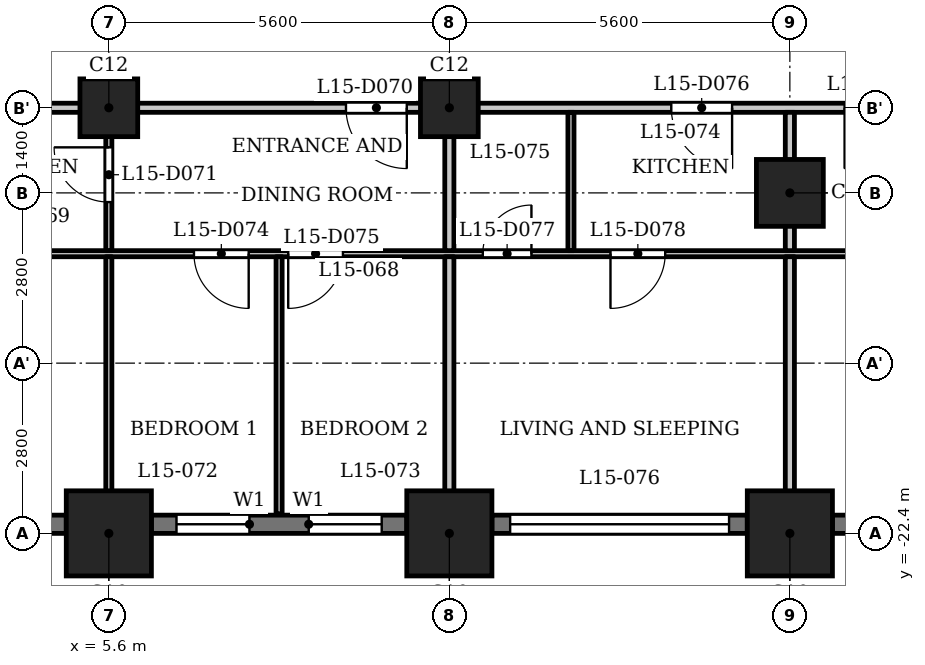
"""IFC4 building model, lengths in metres.
Left out: names, types, materials, properties, quantities, classifications, styles, units other than length and angle.
Written with IfcOpenShell. Run it as: python <this file> out.ifc"""

import sys

from ifc_helpers import new_model, si_unit, direction, frame, frame_2d, origin, origin_2d, place, context, subcontext, project, spatial, rectangle, extrude, element, fill, save


model = new_model("IFC4")
c1 = context("Model", 3, precision=1e-05, world=origin(), true_north=direction((0.0, 1.0)))
c2 = subcontext(c1, "Body", "Model", "MODEL_VIEW")
j1 = project(units=[si_unit("LENGTHUNIT", "METRE"), si_unit("PLANEANGLEUNIT", "RADIAN")], contexts=[c1])
p1 = place(None, origin())
s1 = spatial("IfcSite", under=j1, at=p1, CompositionType="ELEMENT")
p2 = place(p1, origin())
s2 = spatial("IfcBuilding", under=s1, at=p2, CompositionType="ELEMENT")
p3 = place(p2, frame((0.0, 0.0, 62.0)))
s3 = spatial("IfcBuildingStorey", under=s2, at=p3, CompositionType="ELEMENT", Elevation=62.0)
for number, where, z_axis, x_axis in (
    (1, (5.6, -22.4, 0.0), (0.0, 0.0, 1.0), (1.0, 0.0, 0.0)),
    (2, (11.2, -22.4, 0.0), (0.0, 0.0, 1.0), (1.0, 0.0, 0.0)),
    (3, (16.8, -22.4, 0.0), (0.0, 0.0, 1.0), (1.0, 0.0, 0.0)),
):
    element("IfcColumn", number, at=place(p3, frame(where, z_axis=z_axis, x_axis=x_axis)), inside=s3, PredefinedType="COLUMN", context=c2, shape_type="SweptSolid", body=[
        extrude(rectangle(XDim=1.4, YDim=1.4, at=origin_2d()), origin(), (0.0, 0.0, 1.0), 3.5),
    ])
p4 = place(p3, frame((16.8, -16.8, 0.0), z_axis=(0.0, 0.0, 1.0), x_axis=(1.0, 0.0, 0.0)))
e4 = element("IfcColumn", 4, at=p4, inside=s3, PredefinedType="COLUMN", context=c2, shape_type="SweptSolid", body=[
    extrude(rectangle(XDim=1.1, YDim=1.1, at=origin_2d()), origin(), (0.0, 0.0, 1.0), 3.5),
])
for number, where, z_axis, x_axis in (
    (5, (5.6, -15.4, 0.0), (0.0, 0.0, 1.0), (1.0, 0.0, 0.0)),
    (6, (11.2, -15.4, 0.0), (0.0, 0.0, 1.0), (1.0, 0.0, 0.0)),
):
    element("IfcColumn", number, at=place(p3, frame(where, z_axis=z_axis, x_axis=x_axis)), inside=s3, PredefinedType="COLUMN", context=c2, shape_type="SweptSolid", body=[
        extrude(rectangle(XDim=0.95, YDim=0.95, at=origin_2d()), origin(), (0.0, 0.0, 1.0), 3.5),
    ])
p5 = place(p3, frame((0.7, -22.25, 0.0), z_axis=(0.0, 0.0, 1.0), x_axis=(1.0, 0.0, 0.0)))
e7 = element("IfcWall", 7, at=p5, inside=s3, PredefinedType="SOLIDWALL", context=c2, shape_type="SweptSolid", body=[
    extrude(rectangle(XDim=4.2, YDim=0.3, at=frame_2d((2.1, 0.0))), origin(), (0.0, 0.0, 1.0), 2.35),
])
p6 = place(p5, frame((0.3, 0.0, 1.2)))
e8 = element("IfcOpeningElement", 8, at=p6, cuts=e7, PredefinedType="OPENING", context=c2, shape_type="SweptSolid", body=[
    extrude(rectangle(XDim=3.6, YDim=0.95, at=frame_2d((1.8, 0.475))), frame((0.0, 0.16, 0.0), z_axis=(0.0, -1.0, 0.0), x_axis=(1.0, 0.0, 0.0)), (0.0, 0.0, 1.0), 0.32),
])
p7 = place(p3, frame((6.3, -22.25, 0.0), z_axis=(0.0, 0.0, 1.0), x_axis=(1.0, 0.0, 0.0)))
e9 = element("IfcWall", 9, at=p7, inside=s3, PredefinedType="SOLIDWALL", context=c2, shape_type="SweptSolid", body=[
    extrude(rectangle(XDim=4.2, YDim=0.3, at=frame_2d((2.1, 0.0))), origin(), (0.0, 0.0, 1.0), 2.35),
])
p8 = place(p7, frame((0.413, 0.0, 0.6)))
e10 = element("IfcOpeningElement", 10, at=p8, cuts=e9, PredefinedType="OPENING", context=c2, shape_type="SweptSolid", body=[
    extrude(rectangle(XDim=1.2, YDim=1.55, at=frame_2d((0.6, 0.775))), frame((0.0, 0.16, 0.0), z_axis=(0.0, -1.0, 0.0), x_axis=(1.0, 0.0, 0.0)), (0.0, 0.0, 1.0), 0.32),
])
p9 = place(p7, frame((2.587, 0.0, 0.6)))
e11 = element("IfcOpeningElement", 11, at=p9, cuts=e9, PredefinedType="OPENING", context=c2, shape_type="SweptSolid", body=[
    extrude(rectangle(XDim=1.2, YDim=1.55, at=frame_2d((0.6, 0.775))), frame((0.0, 0.16, 0.0), z_axis=(0.0, -1.0, 0.0), x_axis=(1.0, 0.0, 0.0)), (0.0, 0.0, 1.0), 0.32),
])
p10 = place(p3, frame((11.9, -22.25, 0.0), z_axis=(0.0, 0.0, 1.0), x_axis=(1.0, 0.0, 0.0)))
e12 = element("IfcWall", 12, at=p10, inside=s3, PredefinedType="SOLIDWALL", context=c2, shape_type="SweptSolid", body=[
    extrude(rectangle(XDim=4.2, YDim=0.3, at=frame_2d((2.1, 0.0))), origin(), (0.0, 0.0, 1.0), 2.35),
])
p11 = place(p10, frame((0.3, 0.0, 1.2)))
e13 = element("IfcOpeningElement", 13, at=p11, cuts=e12, PredefinedType="OPENING", context=c2, shape_type="SweptSolid", body=[
    extrude(rectangle(XDim=3.6, YDim=0.95, at=frame_2d((1.8, 0.475))), frame((0.0, 0.16, 0.0), z_axis=(0.0, -1.0, 0.0), x_axis=(1.0, 0.0, 0.0)), (0.0, 0.0, 1.0), 0.32),
])
p12 = place(p3, frame((17.5, -22.25, 0.0), z_axis=(0.0, 0.0, 1.0), x_axis=(1.0, 0.0, 0.0)))
e14 = element("IfcWall", 14, at=p12, inside=s3, PredefinedType="SOLIDWALL", context=c2, shape_type="SweptSolid", body=[
    extrude(rectangle(XDim=2.5, YDim=0.3, at=frame_2d((1.25, 0.0))), origin(), (0.0, 0.0, 1.0), 2.35),
])
p13 = place(p12, frame((0.65, 0.0, 0.6)))
e15 = element("IfcOpeningElement", 15, at=p13, cuts=e14, PredefinedType="OPENING", context=c2, shape_type="SweptSolid", body=[
    extrude(rectangle(XDim=1.2, YDim=1.55, at=frame_2d((0.6, 0.775))), frame((0.0, 0.16, 0.0), z_axis=(0.0, -1.0, 0.0), x_axis=(1.0, 0.0, 0.0)), (0.0, 0.0, 1.0), 0.32),
])
p14 = place(p3, frame((-26.394, -17.8, 0.0), z_axis=(0.0, 0.0, 1.0), x_axis=(1.0, 0.0, 0.0)))
e16 = element("IfcWall", 16, at=p14, inside=s3, PredefinedType="PARTITIONING", context=c2, shape_type="SweptSolid", body=[
    extrude(rectangle(XDim=53.034, YDim=0.1, at=frame_2d((26.517, 0.0))), origin(), (0.0, 0.0, 1.0), 3.2),
])
p15 = place(p14, frame((0.794, 0.0, 0.0)))
e17 = element("IfcOpeningElement", 17, at=p15, cuts=e16, PredefinedType="OPENING", context=c2, shape_type="SweptSolid", body=[
    extrude(rectangle(XDim=0.8, YDim=2.1, at=frame_2d((0.4, 1.05))), frame((0.0, 0.06, 0.0), z_axis=(0.0, -1.0, 0.0), x_axis=(1.0, 0.0, 0.0)), (0.0, 0.0, 1.0), 0.12),
])
p16 = place(p14, frame((5.644, 0.0, 0.0)))
e18 = element("IfcOpeningElement", 18, at=p16, cuts=e16, PredefinedType="OPENING", context=c2, shape_type="SweptSolid", body=[
    extrude(rectangle(XDim=0.9, YDim=2.1, at=frame_2d((0.45, 1.05))), frame((0.0, 0.06, 0.0), z_axis=(0.0, -1.0, 0.0), x_axis=(1.0, 0.0, 0.0)), (0.0, 0.0, 1.0), 0.12),
])
p17 = place(p14, frame((10.494, 0.0, 0.0)))
e19 = element("IfcOpeningElement", 19, at=p17, cuts=e16, PredefinedType="OPENING", context=c2, shape_type="SweptSolid", body=[
    extrude(rectangle(XDim=0.8, YDim=2.1, at=frame_2d((0.4, 1.05))), frame((0.0, 0.06, 0.0), z_axis=(0.0, -1.0, 0.0), x_axis=(1.0, 0.0, 0.0)), (0.0, 0.0, 1.0), 0.12),
])
p18 = place(p14, frame((13.844, 0.0, 0.0)))
e20 = element("IfcOpeningElement", 20, at=p18, cuts=e16, PredefinedType="OPENING", context=c2, shape_type="SweptSolid", body=[
    extrude(rectangle(XDim=0.9, YDim=2.1, at=frame_2d((0.45, 1.05))), frame((0.0, 0.06, 0.0), z_axis=(0.0, -1.0, 0.0), x_axis=(1.0, 0.0, 0.0)), (0.0, 0.0, 1.0), 0.12),
])
p19 = place(p14, frame((19.344, 0.0, 0.0)))
e21 = element("IfcOpeningElement", 21, at=p19, cuts=e16, PredefinedType="OPENING", context=c2, shape_type="SweptSolid", body=[
    extrude(rectangle(XDim=0.8, YDim=2.1, at=frame_2d((0.4, 1.05))), frame((0.0, 0.06, 0.0), z_axis=(0.0, -1.0, 0.0), x_axis=(1.0, 0.0, 0.0)), (0.0, 0.0, 1.0), 0.12),
])
p20 = place(p14, frame((16.094, 0.0, 0.0)))
e22 = element("IfcOpeningElement", 22, at=p20, cuts=e16, PredefinedType="OPENING", context=c2, shape_type="SweptSolid", body=[
    extrude(rectangle(XDim=0.9, YDim=2.1, at=frame_2d((0.45, 1.05))), frame((0.0, 0.06, 0.0), z_axis=(0.0, -1.0, 0.0), x_axis=(1.0, 0.0, 0.0)), (0.0, 0.0, 1.0), 0.12),
])
p21 = place(p14, frame((24.944, 0.0, 0.0)))
e23 = element("IfcOpeningElement", 23, at=p21, cuts=e16, PredefinedType="OPENING", context=c2, shape_type="SweptSolid", body=[
    extrude(rectangle(XDim=0.8, YDim=2.1, at=frame_2d((0.4, 1.05))), frame((0.0, 0.06, 0.0), z_axis=(0.0, -1.0, 0.0), x_axis=(1.0, 0.0, 0.0)), (0.0, 0.0, 1.0), 0.12),
])
p22 = place(p14, frame((22.444, 0.0, 0.0)))
e24 = element("IfcOpeningElement", 24, at=p22, cuts=e16, PredefinedType="OPENING", context=c2, shape_type="SweptSolid", body=[
    extrude(rectangle(XDim=0.9, YDim=2.1, at=frame_2d((0.45, 1.05))), frame((0.0, 0.06, 0.0), z_axis=(0.0, -1.0, 0.0), x_axis=(1.0, 0.0, 0.0)), (0.0, 0.0, 1.0), 0.12),
])
p23 = place(p14, frame((26.944, 0.0, 0.0)))
e25 = element("IfcOpeningElement", 25, at=p23, cuts=e16, PredefinedType="OPENING", context=c2, shape_type="SweptSolid", body=[
    extrude(rectangle(XDim=0.8, YDim=2.1, at=frame_2d((0.4, 1.05))), frame((0.0, 0.06, 0.0), z_axis=(0.0, -1.0, 0.0), x_axis=(1.0, 0.0, 0.0)), (0.0, 0.0, 1.0), 0.12),
])
p24 = place(p14, frame((29.794, 0.0, 0.0)))
e26 = element("IfcOpeningElement", 26, at=p24, cuts=e16, PredefinedType="OPENING", context=c2, shape_type="SweptSolid", body=[
    extrude(rectangle(XDim=0.9, YDim=2.1, at=frame_2d((0.45, 1.05))), frame((0.0, 0.06, 0.0), z_axis=(0.0, -1.0, 0.0), x_axis=(1.0, 0.0, 0.0)), (0.0, 0.0, 1.0), 0.12),
])
p25 = place(p14, frame((33.394, 0.0, 0.0)))
e27 = element("IfcOpeningElement", 27, at=p25, cuts=e16, PredefinedType="OPENING", context=c2, shape_type="SweptSolid", body=[
    extrude(rectangle(XDim=0.9, YDim=2.1, at=frame_2d((0.45, 1.05))), frame((0.0, 0.06, 0.0), z_axis=(0.0, -1.0, 0.0), x_axis=(1.0, 0.0, 0.0)), (0.0, 0.0, 1.0), 0.12),
])
p26 = place(p14, frame((34.944, 0.0, 0.0)))
e28 = element("IfcOpeningElement", 28, at=p26, cuts=e16, PredefinedType="OPENING", context=c2, shape_type="SweptSolid", body=[
    extrude(rectangle(XDim=0.9, YDim=2.1, at=frame_2d((0.45, 1.05))), frame((0.0, 0.06, 0.0), z_axis=(0.0, -1.0, 0.0), x_axis=(1.0, 0.0, 0.0)), (0.0, 0.0, 1.0), 0.12),
])
p27 = place(p14, frame((38.144, 0.0, 0.0)))
e29 = element("IfcOpeningElement", 29, at=p27, cuts=e16, PredefinedType="OPENING", context=c2, shape_type="SweptSolid", body=[
    extrude(rectangle(XDim=0.8, YDim=2.1, at=frame_2d((0.4, 1.05))), frame((0.0, 0.06, 0.0), z_axis=(0.0, -1.0, 0.0), x_axis=(1.0, 0.0, 0.0)), (0.0, 0.0, 1.0), 0.12),
])
p28 = place(p14, frame((40.244, 0.0, 0.0)))
e30 = element("IfcOpeningElement", 30, at=p28, cuts=e16, PredefinedType="OPENING", context=c2, shape_type="SweptSolid", body=[
    extrude(rectangle(XDim=0.9, YDim=2.1, at=frame_2d((0.45, 1.05))), frame((0.0, 0.06, 0.0), z_axis=(0.0, -1.0, 0.0), x_axis=(1.0, 0.0, 0.0)), (0.0, 0.0, 1.0), 0.12),
])
p29 = place(p14, frame((49.362, 0.0, 0.0)))
e31 = element("IfcOpeningElement", 31, at=p29, cuts=e16, PredefinedType="OPENING", context=c2, shape_type="SweptSolid", body=[
    extrude(rectangle(XDim=0.8, YDim=2.1, at=frame_2d((0.4, 1.05))), frame((0.0, 0.06, 0.0), z_axis=(0.0, -1.0, 0.0), x_axis=(1.0, 0.0, 0.0)), (0.0, 0.0, 1.0), 0.12),
])
p30 = place(p14, frame((45.094, 0.0, 0.0)))
e32 = element("IfcOpeningElement", 32, at=p30, cuts=e16, PredefinedType="OPENING", context=c2, shape_type="SweptSolid", body=[
    extrude(rectangle(XDim=0.9, YDim=2.1, at=frame_2d((0.45, 1.05))), frame((0.0, 0.06, 0.0), z_axis=(0.0, -1.0, 0.0), x_axis=(1.0, 0.0, 0.0)), (0.0, 0.0, 1.0), 0.12),
])
p31 = place(p3, frame((-27.484, -15.4, 0.0), z_axis=(0.0, 0.0, 1.0), x_axis=(1.0, 0.0, 0.0)))
e33 = element("IfcWall", 33, at=p31, inside=s3, PredefinedType="PARTITIONING", context=c2, shape_type="SweptSolid", body=[
    extrude(rectangle(XDim=54.968, YDim=0.15, at=frame_2d((27.484, 0.0))), origin(), (0.0, 0.0, 1.0), 3.2),
])
p32 = place(p31, frame((5.734, 0.0, 0.0)))
e34 = element("IfcOpeningElement", 34, at=p32, cuts=e33, PredefinedType="OPENING", context=c2, shape_type="SweptSolid", body=[
    extrude(rectangle(XDim=1.0, YDim=2.1, at=frame_2d((0.5, 1.05))), frame((0.0, 0.085, 0.0), z_axis=(0.0, -1.0, 0.0), x_axis=(1.0, 0.0, 0.0)), (0.0, 0.0, 1.0), 0.17),
])
p33 = place(p31, frame((13.934, 0.0, 0.0)))
e35 = element("IfcOpeningElement", 35, at=p33, cuts=e33, PredefinedType="OPENING", context=c2, shape_type="SweptSolid", body=[
    extrude(rectangle(XDim=1.0, YDim=2.1, at=frame_2d((0.5, 1.05))), frame((0.0, 0.085, 0.0), z_axis=(0.0, -1.0, 0.0), x_axis=(1.0, 0.0, 0.0)), (0.0, 0.0, 1.0), 0.17),
])
p34 = place(p31, frame((18.184, 0.0, 0.0)))
e36 = element("IfcOpeningElement", 36, at=p34, cuts=e33, PredefinedType="OPENING", context=c2, shape_type="SweptSolid", body=[
    extrude(rectangle(XDim=1.0, YDim=2.1, at=frame_2d((0.5, 1.05))), frame((0.0, 0.085, 0.0), z_axis=(0.0, -1.0, 0.0), x_axis=(1.0, 0.0, 0.0)), (0.0, 0.0, 1.0), 0.17),
])
p35 = place(p31, frame((22.534, 0.0, 0.0)))
e37 = element("IfcOpeningElement", 37, at=p35, cuts=e33, PredefinedType="OPENING", context=c2, shape_type="SweptSolid", body=[
    extrude(rectangle(XDim=1.0, YDim=2.1, at=frame_2d((0.5, 1.05))), frame((0.0, 0.085, 0.0), z_axis=(0.0, -1.0, 0.0), x_axis=(1.0, 0.0, 0.0)), (0.0, 0.0, 1.0), 0.17),
])
p36 = place(p31, frame((36.984, 0.0, 0.0)))
e38 = element("IfcOpeningElement", 38, at=p36, cuts=e33, PredefinedType="OPENING", context=c2, shape_type="SweptSolid", body=[
    extrude(rectangle(XDim=1.0, YDim=2.1, at=frame_2d((0.5, 1.05))), frame((0.0, 0.085, 0.0), z_axis=(0.0, -1.0, 0.0), x_axis=(1.0, 0.0, 0.0)), (0.0, 0.0, 1.0), 0.17),
])
p37 = place(p31, frame((42.334, 0.0, 0.0)))
e39 = element("IfcOpeningElement", 39, at=p37, cuts=e33, PredefinedType="OPENING", context=c2, shape_type="SweptSolid", body=[
    extrude(rectangle(XDim=1.0, YDim=2.1, at=frame_2d((0.5, 1.05))), frame((0.0, 0.085, 0.0), z_axis=(0.0, -1.0, 0.0), x_axis=(1.0, 0.0, 0.0)), (0.0, 0.0, 1.0), 0.17),
])
p38 = place(p31, frame((45.184, 0.0, 0.0)))
e40 = element("IfcOpeningElement", 40, at=p38, cuts=e33, PredefinedType="OPENING", context=c2, shape_type="SweptSolid", body=[
    extrude(rectangle(XDim=1.0, YDim=2.1, at=frame_2d((0.5, 1.05))), frame((0.0, 0.085, 0.0), z_axis=(0.0, -1.0, 0.0), x_axis=(1.0, 0.0, 0.0)), (0.0, 0.0, 1.0), 0.17),
])
p39 = place(p3, frame((5.6, -23.08, 0.0), z_axis=(0.0, 0.0, 1.0), x_axis=(0.0, 1.0, 0.0)))
e41 = element("IfcWall", 41, at=p39, inside=s3, PredefinedType="PARTITIONING", context=c2, shape_type="SweptSolid", body=[
    extrude(rectangle(XDim=5.23, YDim=0.1, at=frame_2d((2.615, 0.0))), origin(), (0.0, 0.0, 1.0), 3.2),
])
p40 = place(p3, frame((5.6, -17.75, 0.0), z_axis=(0.0, 0.0, 1.0), x_axis=(0.0, 1.0, 0.0)))
e42 = element("IfcWall", 42, at=p40, inside=s3, PredefinedType="PARTITIONING", context=c2, shape_type="SweptSolid", body=[
    extrude(rectangle(XDim=2.275, YDim=0.1, at=frame_2d((1.137, 0.0))), origin(), (0.0, 0.0, 1.0), 3.2),
])
p41 = place(p40, frame((0.799, 0.0, 0.0)))
e43 = element("IfcOpeningElement", 43, at=p41, cuts=e42, PredefinedType="OPENING", context=c2, shape_type="SweptSolid", body=[
    extrude(rectangle(XDim=0.9, YDim=2.1, at=frame_2d((0.45, 1.05))), frame((0.0, 0.06, 0.0), z_axis=(0.0, -1.0, 0.0), x_axis=(1.0, 0.0, 0.0)), (0.0, 0.0, 1.0), 0.12),
])
p42 = place(p3, frame((8.4, -22.08, 0.0), z_axis=(0.0, 0.0, 1.0), x_axis=(0.0, 1.0, 0.0)))
e44 = element("IfcWall", 44, at=p42, inside=s3, PredefinedType="PARTITIONING", context=c2, shape_type="SweptSolid", body=[
    extrude(rectangle(XDim=4.23, YDim=0.1, at=frame_2d((2.115, 0.0))), origin(), (0.0, 0.0, 1.0), 3.2),
])
p43 = place(p3, frame((11.2, -23.08, 0.0), z_axis=(0.0, 0.0, 1.0), x_axis=(0.0, 1.0, 0.0)))
e45 = element("IfcWall", 45, at=p43, inside=s3, PredefinedType="PARTITIONING", context=c2, shape_type="SweptSolid", body=[
    extrude(rectangle(XDim=5.23, YDim=0.15, at=frame_2d((2.615, 0.0))), origin(), (0.0, 0.0, 1.0), 3.2),
])
p44 = place(p3, frame((11.2, -17.75, 0.0), z_axis=(0.0, 0.0, 1.0), x_axis=(0.0, 1.0, 0.0)))
e46 = element("IfcWall", 46, at=p44, inside=s3, PredefinedType="PARTITIONING", context=c2, shape_type="SweptSolid", body=[
    extrude(rectangle(XDim=2.275, YDim=0.15, at=frame_2d((1.137, 0.0))), origin(), (0.0, 0.0, 1.0), 3.2),
])
p45 = place(p3, frame((13.2, -17.75, 0.0), z_axis=(0.0, 0.0, 1.0), x_axis=(0.0, 1.0, 0.0)))
e47 = element("IfcWall", 47, at=p45, inside=s3, PredefinedType="PARTITIONING", context=c2, shape_type="SweptSolid", body=[
    extrude(rectangle(XDim=2.275, YDim=0.1, at=frame_2d((1.137, 0.0))), origin(), (0.0, 0.0, 1.0), 3.2),
])
p46 = place(p3, frame((16.8, -23.08, 0.0), z_axis=(0.0, 0.0, 1.0), x_axis=(0.0, 1.0, 0.0)))
e48 = element("IfcWall", 48, at=p46, inside=s3, PredefinedType="PARTITIONING", context=c2, shape_type="SweptSolid", body=[
    extrude(rectangle(XDim=5.23, YDim=0.15, at=frame_2d((2.615, 0.0))), origin(), (0.0, 0.0, 1.0), 3.2),
])
p47 = place(p3, frame((16.8, -17.75, 0.0), z_axis=(0.0, 0.0, 1.0), x_axis=(0.0, 1.0, 0.0)))
e49 = element("IfcWall", 49, at=p47, inside=s3, PredefinedType="PARTITIONING", context=c2, shape_type="SweptSolid", body=[
    extrude(rectangle(XDim=2.275, YDim=0.15, at=frame_2d((1.137, 0.0))), origin(), (0.0, 0.0, 1.0), 3.2),
])
p48 = place(p36, origin())
e50 = element("IfcDoor", 50, at=p48, inside=s3, OperationType="SINGLE_SWING_RIGHT", PredefinedType="DOOR", context=c2, shape_type="SweptSolid", body=[
    extrude(rectangle(XDim=1.0, YDim=2.1, at=frame_2d((0.5, 1.05))), frame((0.0, 0.025, 0.0), z_axis=(0.0, -1.0, 0.0), x_axis=(1.0, 0.0, 0.0)), (0.0, 0.0, 1.0), 0.05),
])
fill(e38, e50)
p49 = place(p41, origin())
e51 = element("IfcDoor", 51, at=p49, inside=s3, OperationType="SINGLE_SWING_LEFT", PredefinedType="DOOR", context=c2, shape_type="SweptSolid", body=[
    extrude(rectangle(XDim=0.9, YDim=2.1, at=frame_2d((0.45, 1.05))), frame((0.0, 0.025, 0.0), z_axis=(0.0, -1.0, 0.0), x_axis=(1.0, 0.0, 0.0)), (0.0, 0.0, 1.0), 0.05),
])
fill(e43, e51)
p50 = place(p25, origin())
e52 = element("IfcDoor", 52, at=p50, inside=s3, OperationType="SINGLE_SWING_RIGHT", PredefinedType="DOOR", context=c2, shape_type="SweptSolid", body=[
    extrude(rectangle(XDim=0.9, YDim=2.1, at=frame_2d((0.45, 1.05))), frame((0.0, 0.025, 0.0), z_axis=(0.0, -1.0, 0.0), x_axis=(1.0, 0.0, 0.0)), (0.0, 0.0, 1.0), 0.05),
])
fill(e27, e52)
p51 = place(p26, origin())
e53 = element("IfcDoor", 53, at=p51, inside=s3, OperationType="SINGLE_SWING_LEFT", PredefinedType="DOOR", context=c2, shape_type="SweptSolid", body=[
    extrude(rectangle(XDim=0.9, YDim=2.1, at=frame_2d((0.45, 1.05))), frame((0.0, 0.025, 0.0), z_axis=(0.0, -1.0, 0.0), x_axis=(1.0, 0.0, 0.0)), (0.0, 0.0, 1.0), 0.05),
])
fill(e28, e53)
p52 = place(p37, origin())
e54 = element("IfcDoor", 54, at=p52, inside=s3, OperationType="SINGLE_SWING_RIGHT", PredefinedType="DOOR", context=c2, shape_type="SweptSolid", body=[
    extrude(rectangle(XDim=1.0, YDim=2.1, at=frame_2d((0.5, 1.05))), frame((0.0, 0.025, 0.0), z_axis=(0.0, -1.0, 0.0), x_axis=(1.0, 0.0, 0.0)), (0.0, 0.0, 1.0), 0.05),
])
fill(e39, e54)
p53 = place(p27, origin())
e55 = element("IfcDoor", 55, at=p53, inside=s3, OperationType="SINGLE_SWING_LEFT", PredefinedType="DOOR", context=c2, shape_type="SweptSolid", body=[
    extrude(rectangle(XDim=0.8, YDim=2.1, at=frame_2d((0.4, 1.05))), frame((0.0, 0.025, 0.0), z_axis=(0.0, -1.0, 0.0), x_axis=(1.0, 0.0, 0.0)), (0.0, 0.0, 1.0), 0.05),
])
fill(e29, e55)
p54 = place(p28, origin())
e56 = element("IfcDoor", 56, at=p54, inside=s3, OperationType="SINGLE_SWING_LEFT", PredefinedType="DOOR", context=c2, shape_type="SweptSolid", body=[
    extrude(rectangle(XDim=0.9, YDim=2.1, at=frame_2d((0.45, 1.05))), frame((0.0, 0.025, 0.0), z_axis=(0.0, -1.0, 0.0), x_axis=(1.0, 0.0, 0.0)), (0.0, 0.0, 1.0), 0.05),
])
fill(e30, e56)
p55 = place(p38, origin())
e57 = element("IfcDoor", 57, at=p55, inside=s3, OperationType="SINGLE_SWING_LEFT", PredefinedType="DOOR", context=c2, shape_type="SweptSolid", body=[
    extrude(rectangle(XDim=1.0, YDim=2.1, at=frame_2d((0.5, 1.05))), frame((0.0, 0.025, 0.0), z_axis=(0.0, -1.0, 0.0), x_axis=(1.0, 0.0, 0.0)), (0.0, 0.0, 1.0), 0.05),
])
fill(e40, e57)
p56 = place(p8, origin())
e58 = element("IfcWindow", 58, at=p56, inside=s3, PartitioningType="SINGLE_PANEL", PredefinedType="WINDOW", context=c2, shape_type="SweptSolid", body=[
    extrude(rectangle(XDim=1.2, YDim=1.55, at=frame_2d((0.6, 0.775))), frame((0.0, 0.03, 0.0), z_axis=(0.0, -1.0, 0.0), x_axis=(1.0, 0.0, 0.0)), (0.0, 0.0, 1.0), 0.06),
])
fill(e10, e58)
p57 = place(p9, origin())
e59 = element("IfcWindow", 59, at=p57, inside=s3, PartitioningType="SINGLE_PANEL", PredefinedType="WINDOW", context=c2, shape_type="SweptSolid", body=[
    extrude(rectangle(XDim=1.2, YDim=1.55, at=frame_2d((0.6, 0.775))), frame((0.0, 0.03, 0.0), z_axis=(0.0, -1.0, 0.0), x_axis=(1.0, 0.0, 0.0)), (0.0, 0.0, 1.0), 0.06),
])
fill(e11, e59)
p58 = place(p11, origin())
e60 = element("IfcWindow", 60, at=p58, inside=s3, PartitioningType="SINGLE_PANEL", PredefinedType="WINDOW", context=c2, shape_type="SweptSolid", body=[
    extrude(rectangle(XDim=3.6, YDim=0.95, at=frame_2d((1.8, 0.475))), frame((0.0, 0.03, 0.0), z_axis=(0.0, -1.0, 0.0), x_axis=(1.0, 0.0, 0.0)), (0.0, 0.0, 1.0), 0.06),
])
fill(e13, e60)
save(model, sys.argv[1])
